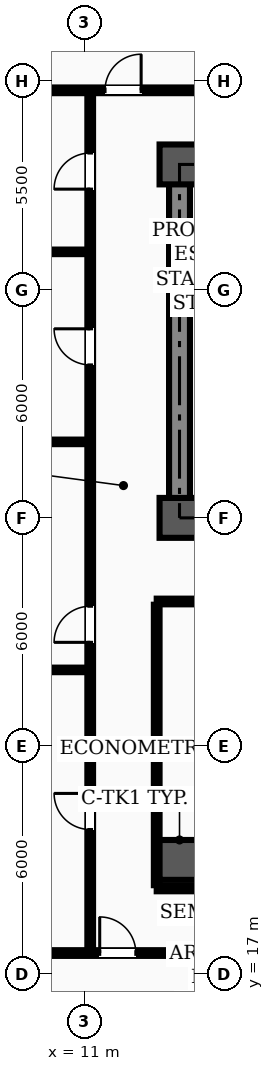
"""IFC4 building model, lengths in metres.
Left out: names, types, materials, properties, quantities, classifications, styles, units other than length and angle.
Written with IfcOpenShell. Run it as: python <this file> out.ifc"""

import sys

from ifc_helpers import new_model, si_unit, direction, frame, frame_2d, origin, origin_2d, place, context, subcontext, project, spatial, rectangle, hollow_rectangle, extrude, element, fill, save


model = new_model("IFC4")
c1 = context("Model", 3, precision=1e-05, world=origin(), true_north=direction((0.0, 1.0)))
c2 = subcontext(c1, "Body", "Model", "MODEL_VIEW")
j1 = project(units=[si_unit("LENGTHUNIT", "METRE"), si_unit("PLANEANGLEUNIT", "RADIAN")], contexts=[c1])
p1 = place(None, origin())
s1 = spatial("IfcSite", under=j1, at=p1, CompositionType="ELEMENT")
p2 = place(p1, origin())
s2 = spatial("IfcBuilding", under=s1, at=p2, CompositionType="ELEMENT")
p3 = place(p2, frame((0.0, 0.0, 26.5)))
s3 = spatial("IfcBuildingStorey", under=s2, at=p3, CompositionType="ELEMENT", Elevation=26.5)
for number, where, z_axis, x_axis in (
    (1, (13.5, 29.0, 0.0), (0.0, 0.0, 1.0), (1.0, 0.0, 0.0)),
    (2, (13.5, 38.3, 0.0), (0.0, 0.0, 1.0), (1.0, 0.0, 0.0)),
    (3, (13.5, 20.0, 0.0), (0.0, 0.0, 1.0), (1.0, 0.0, 0.0)),
):
    element("IfcColumn", number, at=place(p3, frame(where, z_axis=z_axis, x_axis=x_axis)), inside=s3, PredefinedType="COLUMN", context=c2, shape_type="SweptSolid", body=[
        extrude(hollow_rectangle(XDim=1.05, YDim=1.05, WallThickness=0.038, InnerFilletRadius=0.019, OuterFilletRadius=0.057, at=origin_2d()), origin(), (0.0, 0.0, 1.0), 3.9),
    ])
p4 = place(p3, frame((13.5, 29.0, 0.0), z_axis=(0.0, 0.0, 1.0), x_axis=(1.0, 0.0, 0.0)))
e4 = element("IfcWall", 4, at=p4, inside=s3, PredefinedType="SHEAR", context=c2, shape_type="SweptSolid", body=[
    extrude(rectangle(XDim=30.5, YDim=0.55, at=frame_2d((15.25, 0.0))), origin(), (0.0, 0.0, 1.0), 3.72),
])
p5 = place(p4, frame((1.75, 0.0, 0.0)))
e5 = element("IfcOpeningElement", 5, at=p5, cuts=e4, PredefinedType="OPENING", context=c2, shape_type="SweptSolid", body=[
    extrude(rectangle(XDim=1.1, YDim=2.08, at=frame_2d((0.55, 1.04))), frame((0.0, 0.285, 0.0), z_axis=(0.0, -1.0, 0.0), x_axis=(1.0, 0.0, 0.0)), (0.0, 0.0, 1.0), 0.57),
])
p6 = place(p4, frame((26.7, 0.0, 0.0)))
e6 = element("IfcOpeningElement", 6, at=p6, cuts=e4, PredefinedType="OPENING", context=c2, shape_type="SweptSolid", body=[
    extrude(rectangle(XDim=1.1, YDim=2.08, at=frame_2d((0.55, 1.04))), frame((0.0, 0.285, 0.0), z_axis=(0.0, -1.0, 0.0), x_axis=(1.0, 0.0, 0.0)), (0.0, 0.0, 1.0), 0.57),
])
p7 = place(p4, frame((6.8, 0.0, 0.0)))
e7 = element("IfcOpeningElement", 7, at=p7, cuts=e4, PredefinedType="OPENING", context=c2, shape_type="SweptSolid", body=[
    extrude(rectangle(XDim=1.1, YDim=2.08, at=frame_2d((0.55, 1.04))), frame((0.0, 0.285, 0.0), z_axis=(0.0, -1.0, 0.0), x_axis=(1.0, 0.0, 0.0)), (0.0, 0.0, 1.0), 0.57),
])
p8 = place(p4, frame((13.2, 0.0, 0.0)))
e8 = element("IfcOpeningElement", 8, at=p8, cuts=e4, PredefinedType="OPENING", context=c2, shape_type="SweptSolid", body=[
    extrude(rectangle(XDim=1.6, YDim=2.08, at=frame_2d((0.8, 1.04))), frame((0.0, 0.285, 0.0), z_axis=(0.0, -1.0, 0.0), x_axis=(1.0, 0.0, 0.0)), (0.0, 0.0, 1.0), 0.57),
])
p9 = place(p4, frame((20.525, 0.0, 0.0)))
e9 = element("IfcOpeningElement", 9, at=p9, cuts=e4, PredefinedType="OPENING", context=c2, shape_type="SweptSolid", body=[
    extrude(rectangle(XDim=0.95, YDim=2.08, at=frame_2d((0.475, 1.04))), frame((0.0, 0.285, 0.0), z_axis=(0.0, -1.0, 0.0), x_axis=(1.0, 0.0, 0.0)), (0.0, 0.0, 1.0), 0.57),
])
p10 = place(p3, frame((13.5, 38.3, 0.0), z_axis=(0.0, 0.0, 1.0), x_axis=(1.0, 0.0, 0.0)))
e10 = element("IfcWall", 10, at=p10, inside=s3, PredefinedType="SHEAR", context=c2, shape_type="SweptSolid", body=[
    extrude(rectangle(XDim=30.5, YDim=0.55, at=frame_2d((15.25, 0.0))), origin(), (0.0, 0.0, 1.0), 3.72),
])
p11 = place(p3, frame((13.5, 29.35, 0.0), z_axis=(0.0, 0.0, 1.0), x_axis=(0.0, 1.0, 0.0)))
e11 = element("IfcWall", 11, at=p11, inside=s3, PredefinedType="SHEAR", context=c2, shape_type="SweptSolid", body=[
    extrude(rectangle(XDim=8.6, YDim=0.55, at=frame_2d((4.3, 0.0))), origin(), (0.0, 0.0, 1.0), 3.72),
])
p12 = place(p3, frame((12.9, 26.8, 0.0), z_axis=(0.0, 0.0, 1.0), x_axis=(1.0, 0.0, 0.0)))
e12 = element("IfcWall", 12, at=p12, inside=s3, PredefinedType="PARTITIONING", context=c2, shape_type="SweptSolid", body=[
    extrude(rectangle(XDim=31.7, YDim=0.15, at=frame_2d((15.85, 0.0))), origin(), (0.0, 0.0, 1.0), 3.1),
])
p13 = place(p12, frame((13.6, 0.0, 0.0)))
e13 = element("IfcOpeningElement", 13, at=p13, cuts=e12, PredefinedType="OPENING", context=c2, shape_type="SweptSolid", body=[
    extrude(rectangle(XDim=1.6, YDim=2.08, at=frame_2d((0.8, 1.04))), frame((0.0, 0.085, 0.0), z_axis=(0.0, -1.0, 0.0), x_axis=(1.0, 0.0, 0.0)), (0.0, 0.0, 1.0), 0.17),
])
p14 = place(p12, frame((1.775, 0.0, 0.0)))
e14 = element("IfcOpeningElement", 14, at=p14, cuts=e12, PredefinedType="OPENING", context=c2, shape_type="SweptSolid", body=[
    extrude(rectangle(XDim=0.95, YDim=2.08, at=frame_2d((0.475, 1.04))), frame((0.0, 0.085, 0.0), z_axis=(0.0, -1.0, 0.0), x_axis=(1.0, 0.0, 0.0)), (0.0, 0.0, 1.0), 0.17),
])
p15 = place(p12, frame((6.225, 0.0, 0.0)))
e15 = element("IfcOpeningElement", 15, at=p15, cuts=e12, PredefinedType="OPENING", context=c2, shape_type="SweptSolid", body=[
    extrude(rectangle(XDim=0.95, YDim=2.08, at=frame_2d((0.475, 1.04))), frame((0.0, 0.085, 0.0), z_axis=(0.0, -1.0, 0.0), x_axis=(1.0, 0.0, 0.0)), (0.0, 0.0, 1.0), 0.17),
])
p16 = place(p12, frame((10.625, 0.0, 0.0)))
e16 = element("IfcOpeningElement", 16, at=p16, cuts=e12, PredefinedType="OPENING", context=c2, shape_type="SweptSolid", body=[
    extrude(rectangle(XDim=0.95, YDim=2.08, at=frame_2d((0.475, 1.04))), frame((0.0, 0.085, 0.0), z_axis=(0.0, -1.0, 0.0), x_axis=(1.0, 0.0, 0.0)), (0.0, 0.0, 1.0), 0.17),
])
p17 = place(p12, frame((16.075, 0.0, 0.0)))
e17 = element("IfcOpeningElement", 17, at=p17, cuts=e12, PredefinedType="OPENING", context=c2, shape_type="SweptSolid", body=[
    extrude(rectangle(XDim=0.95, YDim=2.08, at=frame_2d((0.475, 1.04))), frame((0.0, 0.085, 0.0), z_axis=(0.0, -1.0, 0.0), x_axis=(1.0, 0.0, 0.0)), (0.0, 0.0, 1.0), 0.17),
])
p18 = place(p12, frame((21.925, 0.0, 0.0)))
e18 = element("IfcOpeningElement", 18, at=p18, cuts=e12, PredefinedType="OPENING", context=c2, shape_type="SweptSolid", body=[
    extrude(rectangle(XDim=0.95, YDim=2.08, at=frame_2d((0.475, 1.04))), frame((0.0, 0.085, 0.0), z_axis=(0.0, -1.0, 0.0), x_axis=(1.0, 0.0, 0.0)), (0.0, 0.0, 1.0), 0.17),
])
p19 = place(p12, frame((28.625, 0.0, 0.0)))
e19 = element("IfcOpeningElement", 19, at=p19, cuts=e12, PredefinedType="OPENING", context=c2, shape_type="SweptSolid", body=[
    extrude(rectangle(XDim=0.95, YDim=2.08, at=frame_2d((0.475, 1.04))), frame((0.0, 0.085, 0.0), z_axis=(0.0, -1.0, 0.0), x_axis=(1.0, 0.0, 0.0)), (0.0, 0.0, 1.0), 0.17),
])
p20 = place(p3, frame((4.66, 17.55, 0.0), z_axis=(0.0, 0.0, 1.0), x_axis=(1.0, 0.0, 0.0)))
e20 = element("IfcWall", 20, at=p20, inside=s3, PredefinedType="PARTITIONING", context=c2, shape_type="SweptSolid", body=[
    extrude(rectangle(XDim=44.68, YDim=0.15, at=frame_2d((22.34, 0.0))), origin(), (0.0, 0.0, 1.0), 3.1),
])
p21 = place(p20, frame((6.74, 0.0, 0.0)))
e21 = element("IfcOpeningElement", 21, at=p21, cuts=e20, PredefinedType="OPENING", context=c2, shape_type="SweptSolid", body=[
    extrude(rectangle(XDim=0.95, YDim=2.08, at=frame_2d((0.475, 1.04))), frame((0.0, 0.085, 0.0), z_axis=(0.0, -1.0, 0.0), x_axis=(1.0, 0.0, 0.0)), (0.0, 0.0, 1.0), 0.17),
])
p22 = place(p20, frame((13.865, 0.0, 0.0)))
e22 = element("IfcOpeningElement", 22, at=p22, cuts=e20, PredefinedType="OPENING", context=c2, shape_type="SweptSolid", body=[
    extrude(rectangle(XDim=0.95, YDim=2.08, at=frame_2d((0.475, 1.04))), frame((0.0, 0.085, 0.0), z_axis=(0.0, -1.0, 0.0), x_axis=(1.0, 0.0, 0.0)), (0.0, 0.0, 1.0), 0.17),
])
p23 = place(p20, frame((28.765, 0.0, 0.0)))
e23 = element("IfcOpeningElement", 23, at=p23, cuts=e20, PredefinedType="OPENING", context=c2, shape_type="SweptSolid", body=[
    extrude(rectangle(XDim=0.95, YDim=2.08, at=frame_2d((0.475, 1.04))), frame((0.0, 0.085, 0.0), z_axis=(0.0, -1.0, 0.0), x_axis=(1.0, 0.0, 0.0)), (0.0, 0.0, 1.0), 0.17),
])
p24 = place(p20, frame((34.465, 0.0, 0.0)))
e24 = element("IfcOpeningElement", 24, at=p24, cuts=e20, PredefinedType="OPENING", context=c2, shape_type="SweptSolid", body=[
    extrude(rectangle(XDim=0.95, YDim=2.08, at=frame_2d((0.475, 1.04))), frame((0.0, 0.085, 0.0), z_axis=(0.0, -1.0, 0.0), x_axis=(1.0, 0.0, 0.0)), (0.0, 0.0, 1.0), 0.17),
])
p25 = place(p20, frame((39.24, 0.0, 0.0)))
e25 = element("IfcOpeningElement", 25, at=p25, cuts=e20, PredefinedType="OPENING", context=c2, shape_type="SweptSolid", body=[
    extrude(rectangle(XDim=0.95, YDim=2.08, at=frame_2d((0.475, 1.04))), frame((0.0, 0.085, 0.0), z_axis=(0.0, -1.0, 0.0), x_axis=(1.0, 0.0, 0.0)), (0.0, 0.0, 1.0), 0.17),
])
p26 = place(p3, frame((12.9, 19.25, 0.0), z_axis=(0.0, 0.0, 1.0), x_axis=(1.0, 0.0, 0.0)))
e26 = element("IfcWall", 26, at=p26, inside=s3, PredefinedType="PARTITIONING", context=c2, shape_type="SweptSolid", body=[
    extrude(rectangle(XDim=13.3, YDim=0.15, at=frame_2d((6.65, 0.0))), origin(), (0.0, 0.0, 1.0), 3.1),
])
p27 = place(p26, frame((1.775, 0.0, 0.0)))
e27 = element("IfcOpeningElement", 27, at=p27, cuts=e26, PredefinedType="OPENING", context=c2, shape_type="SweptSolid", body=[
    extrude(rectangle(XDim=0.95, YDim=2.08, at=frame_2d((0.475, 1.04))), frame((0.0, 0.085, 0.0), z_axis=(0.0, -1.0, 0.0), x_axis=(1.0, 0.0, 0.0)), (0.0, 0.0, 1.0), 0.17),
])
p28 = place(p26, frame((6.225, 0.0, 0.0)))
e28 = element("IfcOpeningElement", 28, at=p28, cuts=e26, PredefinedType="OPENING", context=c2, shape_type="SweptSolid", body=[
    extrude(rectangle(XDim=0.95, YDim=2.08, at=frame_2d((0.475, 1.04))), frame((0.0, 0.085, 0.0), z_axis=(0.0, -1.0, 0.0), x_axis=(1.0, 0.0, 0.0)), (0.0, 0.0, 1.0), 0.17),
])
p29 = place(p26, frame((12.175, 0.0, 0.0)))
e29 = element("IfcOpeningElement", 29, at=p29, cuts=e26, PredefinedType="OPENING", context=c2, shape_type="SweptSolid", body=[
    extrude(rectangle(XDim=0.95, YDim=2.08, at=frame_2d((0.475, 1.04))), frame((0.0, 0.085, 0.0), z_axis=(0.0, -1.0, 0.0), x_axis=(1.0, 0.0, 0.0)), (0.0, 0.0, 1.0), 0.17),
])
p30 = place(p3, frame((12.9, 23.0, 0.0), z_axis=(0.0, 0.0, 1.0), x_axis=(1.0, 0.0, 0.0)))
e30 = element("IfcWall", 30, at=p30, inside=s3, PredefinedType="PARTITIONING", context=c2, shape_type="SweptSolid", body=[
    extrude(rectangle(XDim=4.5, YDim=0.12, at=frame_2d((2.25, 0.0))), origin(), (0.0, 0.0, 1.0), 3.1),
])
for number, where, z_axis, x_axis in (
    (31, (2.31, 25.0, 0.0), (0.0, 0.0, 1.0), (1.0, 0.0, 0.0)),
    (32, (2.31, 31.0, 0.0), (0.0, 0.0, 1.0), (1.0, 0.0, 0.0)),
    (33, (2.31, 36.0, 0.0), (0.0, 0.0, 1.0), (1.0, 0.0, 0.0)),
):
    element("IfcWall", number, at=place(p3, frame(where, z_axis=z_axis, x_axis=x_axis)), inside=s3, PredefinedType="PARTITIONING", context=c2, shape_type="SweptSolid", body=[
        extrude(rectangle(XDim=8.84, YDim=0.12, at=frame_2d((4.42, 0.0))), origin(), (0.0, 0.0, 1.0), 3.212),
    ])
p31 = place(p3, frame((2.31, 40.25, 0.0), z_axis=(0.0, 0.0, 1.0), x_axis=(1.0, 0.0, 0.0)))
e34 = element("IfcWall", 34, at=p31, inside=s3, PredefinedType="PARTITIONING", context=c2, shape_type="SweptSolid", body=[
    extrude(rectangle(XDim=49.38, YDim=0.15, at=frame_2d((24.69, 0.0))), origin(), (0.0, 0.0, 1.0), 3.1),
])
p32 = place(p31, frame((9.23, 0.0, 0.0)))
e35 = element("IfcOpeningElement", 35, at=p32, cuts=e34, PredefinedType="OPENING", context=c2, shape_type="SweptSolid", body=[
    extrude(rectangle(XDim=0.95, YDim=2.08, at=frame_2d((0.475, 1.04))), frame((0.0, 0.085, 0.0), z_axis=(0.0, -1.0, 0.0), x_axis=(1.0, 0.0, 0.0)), (0.0, 0.0, 1.0), 0.17),
])
p33 = place(p31, frame((18.715, 0.0, 0.0)))
e36 = element("IfcOpeningElement", 36, at=p33, cuts=e34, PredefinedType="OPENING", context=c2, shape_type="SweptSolid", body=[
    extrude(rectangle(XDim=0.95, YDim=2.08, at=frame_2d((0.475, 1.04))), frame((0.0, 0.085, 0.0), z_axis=(0.0, -1.0, 0.0), x_axis=(1.0, 0.0, 0.0)), (0.0, 0.0, 1.0), 0.17),
])
p34 = place(p31, frame((26.715, 0.0, 0.0)))
e37 = element("IfcOpeningElement", 37, at=p34, cuts=e34, PredefinedType="OPENING", context=c2, shape_type="SweptSolid", body=[
    extrude(rectangle(XDim=0.95, YDim=2.08, at=frame_2d((0.475, 1.04))), frame((0.0, 0.085, 0.0), z_axis=(0.0, -1.0, 0.0), x_axis=(1.0, 0.0, 0.0)), (0.0, 0.0, 1.0), 0.17),
])
p35 = place(p31, frame((31.765, 0.0, 0.0)))
e38 = element("IfcOpeningElement", 38, at=p35, cuts=e34, PredefinedType="OPENING", context=c2, shape_type="SweptSolid", body=[
    extrude(rectangle(XDim=0.95, YDim=2.08, at=frame_2d((0.475, 1.04))), frame((0.0, 0.085, 0.0), z_axis=(0.0, -1.0, 0.0), x_axis=(1.0, 0.0, 0.0)), (0.0, 0.0, 1.0), 0.17),
])
p36 = place(p31, frame((42.7, 0.0, 0.0)))
e39 = element("IfcOpeningElement", 39, at=p36, cuts=e34, PredefinedType="OPENING", context=c2, shape_type="SweptSolid", body=[
    extrude(rectangle(XDim=0.95, YDim=2.08, at=frame_2d((0.475, 1.04))), frame((0.0, 0.085, 0.0), z_axis=(0.0, -1.0, 0.0), x_axis=(1.0, 0.0, 0.0)), (0.0, 0.0, 1.0), 0.17),
])
p37 = place(p3, frame((11.15, 17.635, 0.0), z_axis=(0.0, 0.0, 1.0), x_axis=(0.0, 1.0, 0.0)))
e40 = element("IfcWall", 40, at=p37, inside=s3, PredefinedType="PARTITIONING", context=c2, shape_type="SweptSolid", body=[
    extrude(rectangle(XDim=22.53, YDim=0.15, at=frame_2d((11.265, 0.0))), origin(), (0.0, 0.0, 1.0), 3.0),
])
p38 = place(p37, frame((3.165, 0.0, 0.0)))
e41 = element("IfcOpeningElement", 41, at=p38, cuts=e40, PredefinedType="OPENING", context=c2, shape_type="SweptSolid", body=[
    extrude(rectangle(XDim=0.95, YDim=2.08, at=frame_2d((0.475, 1.04))), frame((0.0, 0.085, 0.0), z_axis=(0.0, -1.0, 0.0), x_axis=(1.0, 0.0, 0.0)), (0.0, 0.0, 1.0), 0.17),
])
p39 = place(p37, frame((8.09, 0.0, 0.0)))
e42 = element("IfcOpeningElement", 42, at=p39, cuts=e40, PredefinedType="OPENING", context=c2, shape_type="SweptSolid", body=[
    extrude(rectangle(XDim=0.95, YDim=2.08, at=frame_2d((0.475, 1.04))), frame((0.0, 0.085, 0.0), z_axis=(0.0, -1.0, 0.0), x_axis=(1.0, 0.0, 0.0)), (0.0, 0.0, 1.0), 0.17),
])
p40 = place(p37, frame((15.39, 0.0, 0.0)))
e43 = element("IfcOpeningElement", 43, at=p40, cuts=e40, PredefinedType="OPENING", context=c2, shape_type="SweptSolid", body=[
    extrude(rectangle(XDim=0.95, YDim=2.08, at=frame_2d((0.475, 1.04))), frame((0.0, 0.085, 0.0), z_axis=(0.0, -1.0, 0.0), x_axis=(1.0, 0.0, 0.0)), (0.0, 0.0, 1.0), 0.17),
])
p41 = place(p37, frame((20.015, 0.0, 0.0)))
e44 = element("IfcOpeningElement", 44, at=p41, cuts=e40, PredefinedType="OPENING", context=c2, shape_type="SweptSolid", body=[
    extrude(rectangle(XDim=0.95, YDim=2.08, at=frame_2d((0.475, 1.04))), frame((0.0, 0.085, 0.0), z_axis=(0.0, -1.0, 0.0), x_axis=(1.0, 0.0, 0.0)), (0.0, 0.0, 1.0), 0.17),
])
p42 = place(p3, frame((12.9, 19.335, 0.0), z_axis=(0.0, 0.0, 1.0), x_axis=(0.0, 1.0, 0.0)))
e45 = element("IfcWall", 45, at=p42, inside=s3, PredefinedType="PARTITIONING", context=c2, shape_type="SweptSolid", body=[
    extrude(rectangle(XDim=7.38, YDim=0.15, at=frame_2d((3.69, 0.0))), origin(), (0.0, 0.0, 1.0), 3.0),
])
p43 = place(p21, origin())
e46 = element("IfcDoor", 46, at=p43, inside=s3, OperationType="SINGLE_SWING_LEFT", PredefinedType="DOOR", context=c2, shape_type="SweptSolid", body=[
    extrude(rectangle(XDim=0.95, YDim=2.08, at=frame_2d((0.475, 1.04))), frame((0.0, 0.025, 0.0), z_axis=(0.0, -1.0, 0.0), x_axis=(1.0, 0.0, 0.0)), (0.0, 0.0, 1.0), 0.05),
])
fill(e21, e46)
p44 = place(p38, origin())
e47 = element("IfcDoor", 47, at=p44, inside=s3, OperationType="SINGLE_SWING_RIGHT", PredefinedType="DOOR", context=c2, shape_type="SweptSolid", body=[
    extrude(rectangle(XDim=0.95, YDim=2.08, at=frame_2d((0.475, 1.04))), frame((0.0, 0.025, 0.0), z_axis=(0.0, -1.0, 0.0), x_axis=(1.0, 0.0, 0.0)), (0.0, 0.0, 1.0), 0.05),
])
fill(e41, e47)
p45 = place(p39, origin())
e48 = element("IfcDoor", 48, at=p45, inside=s3, OperationType="SINGLE_SWING_LEFT", PredefinedType="DOOR", context=c2, shape_type="SweptSolid", body=[
    extrude(rectangle(XDim=0.95, YDim=2.08, at=frame_2d((0.475, 1.04))), frame((0.0, 0.025, 0.0), z_axis=(0.0, -1.0, 0.0), x_axis=(1.0, 0.0, 0.0)), (0.0, 0.0, 1.0), 0.05),
])
fill(e42, e48)
p46 = place(p40, origin())
e49 = element("IfcDoor", 49, at=p46, inside=s3, OperationType="SINGLE_SWING_RIGHT", PredefinedType="DOOR", context=c2, shape_type="SweptSolid", body=[
    extrude(rectangle(XDim=0.95, YDim=2.08, at=frame_2d((0.475, 1.04))), frame((0.0, 0.025, 0.0), z_axis=(0.0, -1.0, 0.0), x_axis=(1.0, 0.0, 0.0)), (0.0, 0.0, 1.0), 0.05),
])
fill(e43, e49)
p47 = place(p41, origin())
e50 = element("IfcDoor", 50, at=p47, inside=s3, OperationType="SINGLE_SWING_LEFT", PredefinedType="DOOR", context=c2, shape_type="SweptSolid", body=[
    extrude(rectangle(XDim=0.95, YDim=2.08, at=frame_2d((0.475, 1.04))), frame((0.0, 0.025, 0.0), z_axis=(0.0, -1.0, 0.0), x_axis=(1.0, 0.0, 0.0)), (0.0, 0.0, 1.0), 0.05),
])
fill(e44, e50)
p48 = place(p32, origin())
e51 = element("IfcDoor", 51, at=p48, inside=s3, OperationType="SINGLE_SWING_RIGHT", PredefinedType="DOOR", context=c2, shape_type="SweptSolid", body=[
    extrude(rectangle(XDim=0.95, YDim=2.08, at=frame_2d((0.475, 1.04))), frame((0.0, 0.025, 0.0), z_axis=(0.0, -1.0, 0.0), x_axis=(1.0, 0.0, 0.0)), (0.0, 0.0, 1.0), 0.05),
])
fill(e35, e51)
save(model, sys.argv[1])
